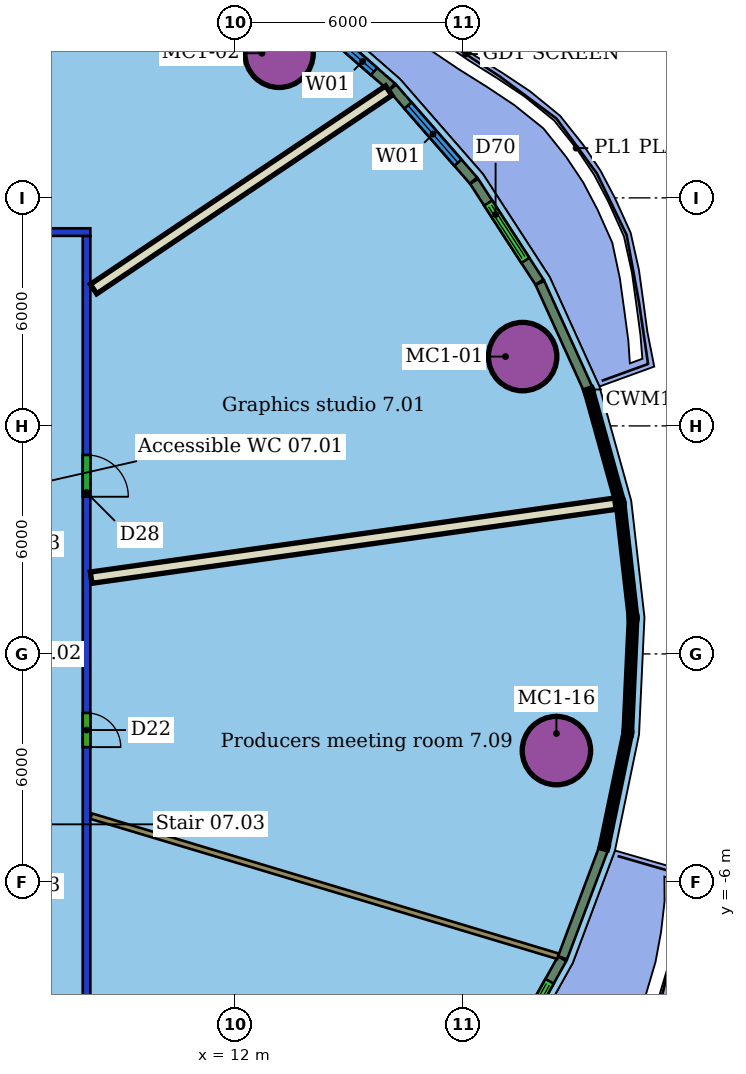
"""IFC4 building model, lengths in metres.
Left out: names, types, materials, properties, quantities, classifications, styles, units other than length and angle.
Written with IfcOpenShell. Run it as: python <this file> out.ifc"""

import sys

from ifc_helpers import new_model, si_unit, direction, frame, frame_2d, origin, origin_2d, place, context, subcontext, project, spatial, rectangle, hollow_circle, extrude, element, fill, save


model = new_model("IFC4")
c1 = context("Model", 3, precision=1e-05, world=origin(), true_north=direction((0.0, 1.0)))
c2 = subcontext(c1, "Body", "Model", "MODEL_VIEW")
j1 = project(units=[si_unit("LENGTHUNIT", "METRE"), si_unit("PLANEANGLEUNIT", "RADIAN")], contexts=[c1])
p1 = place(None, origin())
s1 = spatial("IfcSite", under=j1, at=p1, CompositionType="ELEMENT")
p2 = place(p1, origin())
s2 = spatial("IfcBuilding", under=s1, at=p2, CompositionType="ELEMENT")
p3 = place(p2, frame((0.0, 0.0, 43.4)))
s3 = spatial("IfcBuildingStorey", under=s2, at=p3, CompositionType="ELEMENT", Elevation=43.4)
for number, where, z_axis, x_axis in (
    (1, (19.575, 7.824, 0.0), (0.0, 0.0, 1.0), (1.0, 0.0, 0.0)),
    (2, (13.166, 15.805, 0.0), (0.0, 0.0, 1.0), (1.0, 0.0, 0.0)),
    (3, (20.464, -2.543, 0.0), (0.0, 0.0, 1.0), (1.0, 0.0, 0.0)),
):
    element("IfcColumn", number, at=place(p3, frame(where, z_axis=z_axis, x_axis=x_axis)), inside=s3, PredefinedType="COLUMN", context=c2, shape_type="SweptSolid", body=[
        extrude(hollow_circle(Radius=0.9, WallThickness=0.06, at=origin_2d()), origin(), (0.0, 0.0, 1.0), 3.55),
    ])
p4 = place(p3, frame((-20.2, 11.1, 0.0), z_axis=(0.0, 0.0, 1.0), x_axis=(1.0, 0.0, 0.0)))
e4 = element("IfcWall", 4, at=p4, inside=s3, PredefinedType="PARTITIONING", context=c2, shape_type="SweptSolid", body=[
    extrude(rectangle(XDim=28.4, YDim=0.2, at=frame_2d((14.2, 0.0))), origin(), (0.0, 0.0, 1.0), 2.85),
])
p5 = place(p4, frame((16.582, 0.0, 0.0)))
e5 = element("IfcOpeningElement", 5, at=p5, cuts=e4, PredefinedType="OPENING", context=c2, shape_type="SweptSolid", body=[
    extrude(rectangle(XDim=1.8, YDim=2.1, at=frame_2d((0.9, 1.05))), frame((0.0, 0.11, 0.0), z_axis=(0.0, -1.0, 0.0), x_axis=(1.0, 0.0, 0.0)), (0.0, 0.0, 1.0), 0.22),
])
p6 = place(p4, frame((9.077, 0.0, 0.0)))
e6 = element("IfcOpeningElement", 6, at=p6, cuts=e4, PredefinedType="OPENING", context=c2, shape_type="SweptSolid", body=[
    extrude(rectangle(XDim=1.0, YDim=2.1, at=frame_2d((0.5, 1.05))), frame((0.0, 0.11, 0.0), z_axis=(0.0, -1.0, 0.0), x_axis=(1.0, 0.0, 0.0)), (0.0, 0.0, 1.0), 0.22),
])
p7 = place(p4, frame((4.156, 0.0, 0.0)))
e7 = element("IfcOpeningElement", 7, at=p7, cuts=e4, PredefinedType="OPENING", context=c2, shape_type="SweptSolid", body=[
    extrude(rectangle(XDim=1.8, YDim=2.1, at=frame_2d((0.9, 1.05))), frame((0.0, 0.11, 0.0), z_axis=(0.0, -1.0, 0.0), x_axis=(1.0, 0.0, 0.0)), (0.0, 0.0, 1.0), 0.22),
])
p8 = place(p3, frame((8.1, 11.0, 0.0), z_axis=(0.0, 0.0, 1.0), x_axis=(0.0, -1.0, 0.0)))
e8 = element("IfcWall", 8, at=p8, inside=s3, PredefinedType="PARTITIONING", context=c2, shape_type="SweptSolid", body=[
    extrude(rectangle(XDim=22.0, YDim=0.2, at=frame_2d((11.0, 0.0))), origin(), (0.0, 0.0, 1.0), 2.85),
])
p9 = place(p8, frame((5.764, 0.0, 0.0)))
e9 = element("IfcOpeningElement", 9, at=p9, cuts=e8, PredefinedType="OPENING", context=c2, shape_type="SweptSolid", body=[
    extrude(rectangle(XDim=1.1, YDim=2.1, at=frame_2d((0.55, 1.05))), frame((0.0, 0.11, 0.0), z_axis=(0.0, -1.0, 0.0), x_axis=(1.0, 0.0, 0.0)), (0.0, 0.0, 1.0), 0.22),
])
p10 = place(p8, frame((12.552, 0.0, 0.0)))
e10 = element("IfcOpeningElement", 10, at=p10, cuts=e8, PredefinedType="OPENING", context=c2, shape_type="SweptSolid", body=[
    extrude(rectangle(XDim=0.9, YDim=2.1, at=frame_2d((0.45, 1.05))), frame((0.0, 0.11, 0.0), z_axis=(0.0, -1.0, 0.0), x_axis=(1.0, 0.0, 0.0)), (0.0, 0.0, 1.0), 0.22),
])
p11 = place(p3, frame((22.015, 3.954, 0.0), z_axis=(0.0, 0.0, 1.0), x_axis=(-0.990187126377, -0.139747825588, 0.0)))
e11 = element("IfcWall", 11, at=p11, inside=s3, PredefinedType="PARTITIONING", context=c2, shape_type="SweptSolid", body=[
    extrude(rectangle(XDim=13.931, YDim=0.3, at=frame_2d((6.965, 0.0))), origin(), (0.0, 0.0, 1.0), 3.55),
])
p12 = place(p3, frame((16.052, 14.822, 0.0), z_axis=(0.0, 0.0, 1.0), x_axis=(-0.829941674659, -0.557850174029, 0.0)))
e12 = element("IfcWall", 12, at=p12, inside=s3, PredefinedType="PARTITIONING", context=c2, shape_type="SweptSolid", body=[
    extrude(rectangle(XDim=9.36, YDim=0.3, at=frame_2d((4.68, 0.0))), origin(), (0.0, 0.0, 1.0), 3.55),
])
p13 = place(p3, frame((20.508, -7.955, 0.0), z_axis=(0.0, 0.0, 1.0), x_axis=(-0.957795897573, 0.287449158275, 0.0)))
e13 = element("IfcWall", 13, at=p13, inside=s3, PredefinedType="PARTITIONING", context=c2, shape_type="SweptSolid", body=[
    extrude(rectangle(XDim=12.827, YDim=0.15, at=frame_2d((6.414, 0.0))), origin(), (0.0, 0.0, 1.0), 3.55),
])
p14 = place(p3, frame((21.292, 6.983, 0.0), z_axis=(0.0, 0.0, 1.0), x_axis=(-0.413441056797, 0.910530885008, 0.0)))
e14 = element("IfcWall", 14, at=p14, inside=s3, PredefinedType="SOLIDWALL", context=c2, shape_type="SweptSolid", body=[
    extrude(rectangle(XDim=3.05, YDim=0.25, at=frame_2d((1.525, 0.0))), origin(), (0.0, 0.0, 1.0), 3.15),
])
p15 = place(p3, frame((20.018, 9.784, 0.0), z_axis=(0.0, 0.0, 1.0), x_axis=(-0.544086790483, 0.839028941349, 0.0)))
e15 = element("IfcWall", 15, at=p15, inside=s3, PredefinedType="SOLIDWALL", context=c2, shape_type="SweptSolid", body=[
    extrude(rectangle(XDim=3.161, YDim=0.25, at=frame_2d((1.581, 0.0))), origin(), (0.0, 0.0, 1.0), 3.15),
])
p16 = place(p15, frame((0.681, 0.0, 0.0)))
e16 = element("IfcOpeningElement", 16, at=p16, cuts=e15, PredefinedType="OPENING", context=c2, shape_type="SweptSolid", body=[
    extrude(rectangle(XDim=1.8, YDim=2.4, at=frame_2d((0.9, 1.2))), frame((0.0, 0.135, 0.0), z_axis=(0.0, -1.0, 0.0), x_axis=(1.0, 0.0, 0.0)), (0.0, 0.0, 1.0), 0.27),
])
p17 = place(p3, frame((18.282, 12.457, 0.0), z_axis=(0.0, 0.0, 1.0), x_axis=(-0.657550554533, 0.753410424824, 0.0)))
e17 = element("IfcWall", 17, at=p17, inside=s3, PredefinedType="SOLIDWALL", context=c2, shape_type="SweptSolid", body=[
    extrude(rectangle(XDim=3.245, YDim=0.25, at=frame_2d((1.622, 0.0))), origin(), (0.0, 0.0, 1.0), 3.15),
])
p18 = place(p17, frame((0.622, 0.0, 0.8)))
e18 = element("IfcOpeningElement", 18, at=p18, cuts=e17, PredefinedType="OPENING", context=c2, shape_type="SweptSolid", body=[
    extrude(rectangle(XDim=2.0, YDim=2.2, at=frame_2d((1.0, 1.1))), frame((0.0, 0.135, 0.0), z_axis=(0.0, -1.0, 0.0), x_axis=(1.0, 0.0, 0.0)), (0.0, 0.0, 1.0), 0.27),
])
p19 = place(p3, frame((16.131, 14.919, 0.0), z_axis=(0.0, 0.0, 1.0), x_axis=(-0.753152288186, 0.657846206039, 0.0)))
e19 = element("IfcWall", 19, at=p19, inside=s3, PredefinedType="SOLIDWALL", context=c2, shape_type="SweptSolid", body=[
    extrude(rectangle(XDim=3.335, YDim=0.25, at=frame_2d((1.667, 0.0))), origin(), (0.0, 0.0, 1.0), 3.15),
])
p20 = place(p19, frame((0.618, 0.0, 0.8)))
e20 = element("IfcOpeningElement", 20, at=p20, cuts=e19, PredefinedType="OPENING", context=c2, shape_type="SweptSolid", body=[
    extrude(rectangle(XDim=2.0, YDim=2.2, at=frame_2d((1.0, 1.1))), frame((0.0, 0.135, 0.0), z_axis=(0.0, -1.0, 0.0), x_axis=(1.0, 0.0, 0.0)), (0.0, 0.0, 1.0), 0.27),
])
p21 = place(p3, frame((19.076, -10.781, 0.0), z_axis=(0.0, 0.0, 1.0), x_axis=(0.486652480259, 0.873595652152, 0.0)))
e21 = element("IfcWall", 21, at=p21, inside=s3, PredefinedType="SOLIDWALL", context=c2, shape_type="SweptSolid", body=[
    extrude(rectangle(XDim=3.161, YDim=0.25, at=frame_2d((1.581, 0.0))), origin(), (0.0, 0.0, 1.0), 3.15),
])
p22 = place(p21, frame((0.681, 0.0, 0.0)))
e22 = element("IfcOpeningElement", 22, at=p22, cuts=e21, PredefinedType="OPENING", context=c2, shape_type="SweptSolid", body=[
    extrude(rectangle(XDim=1.8, YDim=2.4, at=frame_2d((0.9, 1.2))), frame((0.0, 0.135, 0.0), z_axis=(0.0, -1.0, 0.0), x_axis=(1.0, 0.0, 0.0)), (0.0, 0.0, 1.0), 0.27),
])
p23 = place(p3, frame((20.626, -7.995, 0.0), z_axis=(0.0, 0.0, 1.0), x_axis=(0.351570793039, 0.936161298859, 0.0)))
e23 = element("IfcWall", 23, at=p23, inside=s3, PredefinedType="SOLIDWALL", context=c2, shape_type="SweptSolid", body=[
    extrude(rectangle(XDim=3.05, YDim=0.25, at=frame_2d((1.525, 0.0))), origin(), (0.0, 0.0, 1.0), 3.15),
])
p24 = place(p9, origin())
e24 = element("IfcDoor", 24, at=p24, inside=s3, OperationType="SINGLE_SWING_RIGHT", PredefinedType="DOOR", context=c2, shape_type="SweptSolid", body=[
    extrude(rectangle(XDim=1.1, YDim=2.1, at=frame_2d((0.55, 1.05))), frame((0.0, 0.025, 0.0), z_axis=(0.0, -1.0, 0.0), x_axis=(1.0, 0.0, 0.0)), (0.0, 0.0, 1.0), 0.05),
])
fill(e9, e24)
p25 = place(p10, origin())
e25 = element("IfcDoor", 25, at=p25, inside=s3, OperationType="SINGLE_SWING_RIGHT", PredefinedType="DOOR", context=c2, shape_type="SweptSolid", body=[
    extrude(rectangle(XDim=0.9, YDim=2.1, at=frame_2d((0.45, 1.05))), frame((0.0, 0.025, 0.0), z_axis=(0.0, -1.0, 0.0), x_axis=(1.0, 0.0, 0.0)), (0.0, 0.0, 1.0), 0.05),
])
fill(e10, e25)
p26 = place(p16, origin())
e26 = element("IfcDoor", 26, at=p26, inside=s3, OperationType="DOUBLE_DOOR_SLIDING", PredefinedType="DOOR", context=c2, shape_type="SweptSolid", body=[
    extrude(rectangle(XDim=1.8, YDim=2.4, at=frame_2d((0.9, 1.2))), frame((0.0, 0.025, 0.0), z_axis=(0.0, -1.0, 0.0), x_axis=(1.0, 0.0, 0.0)), (0.0, 0.0, 1.0), 0.05),
])
fill(e16, e26)
p27 = place(p18, origin())
e27 = element("IfcWindow", 27, at=p27, inside=s3, PartitioningType="SINGLE_PANEL", PredefinedType="WINDOW", context=c2, shape_type="SweptSolid", body=[
    extrude(rectangle(XDim=2.0, YDim=2.2, at=frame_2d((1.0, 1.1))), frame((0.0, 0.03, 0.0), z_axis=(0.0, -1.0, 0.0), x_axis=(1.0, 0.0, 0.0)), (0.0, 0.0, 1.0), 0.06),
])
fill(e18, e27)
p28 = place(p20, origin())
e28 = element("IfcWindow", 28, at=p28, inside=s3, PartitioningType="SINGLE_PANEL", PredefinedType="WINDOW", context=c2, shape_type="SweptSolid", body=[
    extrude(rectangle(XDim=2.0, YDim=2.2, at=frame_2d((1.0, 1.1))), frame((0.0, 0.03, 0.0), z_axis=(0.0, -1.0, 0.0), x_axis=(1.0, 0.0, 0.0)), (0.0, 0.0, 1.0), 0.06),
])
fill(e20, e28)
p29 = place(p22, origin())
e29 = element("IfcDoor", 29, at=p29, inside=s3, OperationType="DOUBLE_DOOR_SLIDING", PredefinedType="DOOR", context=c2, shape_type="SweptSolid", body=[
    extrude(rectangle(XDim=1.8, YDim=2.4, at=frame_2d((0.9, 1.2))), frame((0.0, 0.025, 0.0), z_axis=(0.0, -1.0, 0.0), x_axis=(1.0, 0.0, 0.0)), (0.0, 0.0, 1.0), 0.05),
])
fill(e22, e29)
save(model, sys.argv[1])
